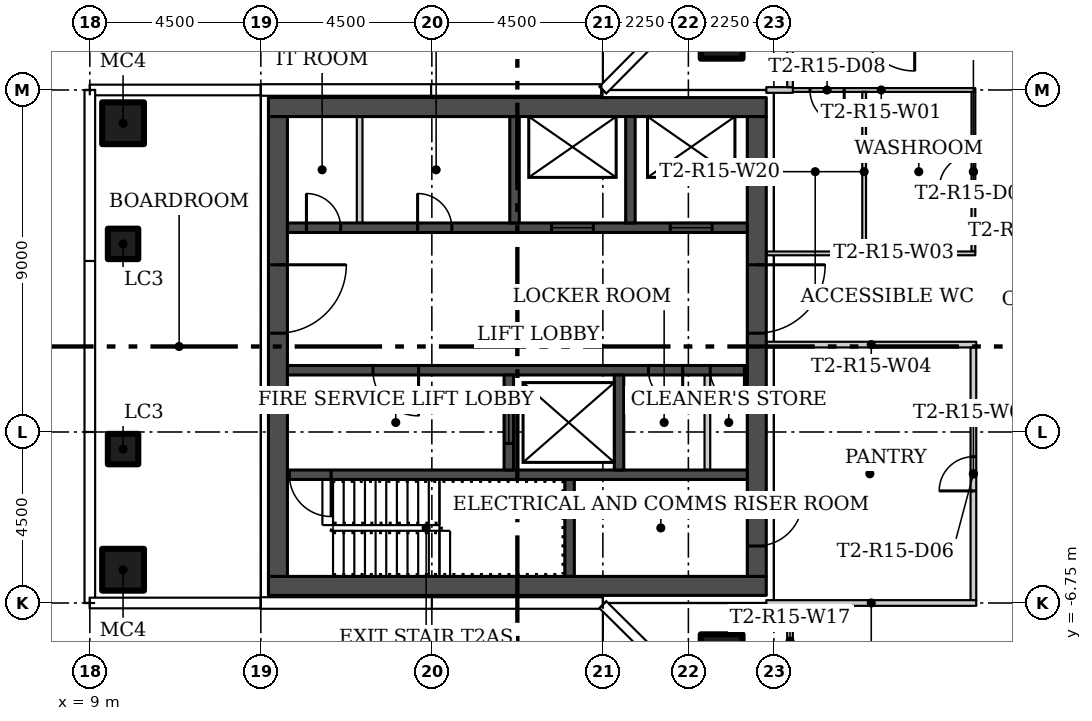
"""IFC4 building model, lengths in metres.
Left out: names, types, materials, properties, quantities, classifications, styles, units other than length and angle.
Written with IfcOpenShell. Run it as: python <this file> out.ifc"""

import sys

from ifc_helpers import new_model, si_unit, direction, frame, frame_2d, origin, origin_2d, place, context, subcontext, project, spatial, rectangle, hollow_rectangle, extrude, element, fill, save


model = new_model("IFC4")
c1 = context("Model", 3, precision=1e-05, world=origin(), true_north=direction((0.0, 1.0)))
c2 = subcontext(c1, "Body", "Model", "MODEL_VIEW")
j1 = project(units=[si_unit("LENGTHUNIT", "METRE"), si_unit("PLANEANGLEUNIT", "RADIAN")], contexts=[c1])
p1 = place(None, origin())
s1 = spatial("IfcSite", under=j1, at=p1, CompositionType="ELEMENT")
p2 = place(p1, origin())
s2 = spatial("IfcBuilding", under=s1, at=p2, CompositionType="ELEMENT")
p3 = place(p2, frame((0.0, 0.0, 142.8)))
s3 = spatial("IfcBuildingStorey", under=s2, at=p3, CompositionType="ELEMENT", Elevation=142.8)
for number, where in (
    (1, (25.625, 8.125, 0.0)),
    (2, (25.625, -8.125, 0.0)),
    (3, (9.875, -5.875, 0.0)),
    (4, (9.875, 5.875, 0.0)),
):
    element("IfcColumn", number, at=place(p3, frame(where)), inside=s3, PredefinedType="COLUMN", context=c2, shape_type="SweptSolid", body=[
        extrude(hollow_rectangle(XDim=1.1, YDim=1.1, WallThickness=0.04, at=origin_2d()), origin(), (0.0, 0.0, 1.0), 3.55),
    ])
for number, where in (
    (5, (9.875, -2.7, 0.0)),
    (6, (9.875, 2.7, 0.0)),
):
    element("IfcColumn", number, at=place(p3, frame(where)), inside=s3, PredefinedType="COLUMN", context=c2, shape_type="SweptSolid", body=[
        extrude(hollow_rectangle(XDim=0.8, YDim=0.8, WallThickness=0.03, at=origin_2d()), origin(), (0.0, 0.0, 1.0), 3.55),
    ])
p4 = place(p3, frame((32.3, 6.75, 0.0), z_axis=(0.0, 0.0, 1.0), x_axis=(-1.0, 0.0, 0.0)))
e7 = element("IfcWall", 7, at=p4, inside=s3, PredefinedType="PARTITIONING", context=c2, shape_type="SweptSolid", body=[
    extrude(rectangle(XDim=4.95, YDim=0.1, at=frame_2d((2.475, 0.0))), origin(), (0.0, 0.0, 1.0), 3.55),
])
p5 = place(p4, frame((3.45, 0.0, 0.0)))
e8 = element("IfcOpeningElement", 8, at=p5, cuts=e7, PredefinedType="OPENING", context=c2, shape_type="SweptSolid", body=[
    extrude(rectangle(XDim=0.9, YDim=2.1, at=frame_2d((0.45, 1.05))), frame((0.0, 0.06, 0.0), z_axis=(0.0, -1.0, 0.0), x_axis=(1.0, 0.0, 0.0)), (0.0, 0.0, 1.0), 0.12),
])
p6 = place(p3, frame((32.25, 2.5, 0.0), z_axis=(0.0, 0.0, 1.0), x_axis=(0.0, 1.0, 0.0)))
e9 = element("IfcWall", 9, at=p6, inside=s3, PredefinedType="PARTITIONING", context=c2, shape_type="SweptSolid", body=[
    extrude(rectangle(XDim=4.2, YDim=0.1, at=frame_2d((2.1, 0.0))), origin(), (0.0, 0.0, 1.0), 3.55),
])
p7 = place(p6, frame((1.65, 0.0, 0.0)))
e10 = element("IfcOpeningElement", 10, at=p7, cuts=e9, PredefinedType="OPENING", context=c2, shape_type="SweptSolid", body=[
    extrude(rectangle(XDim=0.9, YDim=2.1, at=frame_2d((0.45, 1.05))), frame((0.0, 0.06, 0.0), z_axis=(0.0, -1.0, 0.0), x_axis=(1.0, 0.0, 0.0)), (0.0, 0.0, 1.0), 0.12),
])
p8 = place(p3, frame((26.8, 2.45, 0.0)))
e11 = element("IfcWall", 11, at=p8, inside=s3, PredefinedType="PARTITIONING", context=c2, shape_type="SweptSolid", body=[
    extrude(rectangle(XDim=5.5, YDim=0.1, at=frame_2d((2.75, 0.0))), origin(), (0.0, 0.0, 1.0), 3.55),
])
p9 = place(p3, frame((32.325, 0.05, 0.0), z_axis=(0.0, 0.0, 1.0), x_axis=(-1.0, 0.0, 0.0)))
e12 = element("IfcWall", 12, at=p9, inside=s3, PredefinedType="PARTITIONING", context=c2, shape_type="SweptSolid", body=[
    extrude(rectangle(XDim=5.525, YDim=0.15, at=frame_2d((2.762, 0.0))), origin(), (0.0, 0.0, 1.0), 3.55),
])
p10 = place(p3, frame((32.25, -6.675, 0.0), z_axis=(0.0, 0.0, 1.0), x_axis=(0.0, 1.0, 0.0)))
e13 = element("IfcWall", 13, at=p10, inside=s3, PredefinedType="PARTITIONING", context=c2, shape_type="SweptSolid", body=[
    extrude(rectangle(XDim=6.65, YDim=0.15, at=frame_2d((3.325, 0.0))), origin(), (0.0, 0.0, 1.0), 3.55),
])
p11 = place(p10, frame((2.875, 0.0, 0.0)))
e14 = element("IfcOpeningElement", 14, at=p11, cuts=e13, PredefinedType="OPENING", context=c2, shape_type="SweptSolid", body=[
    extrude(rectangle(XDim=0.9, YDim=2.1, at=frame_2d((0.45, 1.05))), frame((0.0, 0.085, 0.0), z_axis=(0.0, -1.0, 0.0), x_axis=(1.0, 0.0, 0.0)), (0.0, 0.0, 1.0), 0.17),
])
p12 = place(p3, frame((26.8, -6.75, 0.0)))
e15 = element("IfcWall", 15, at=p12, inside=s3, PredefinedType="PARTITIONING", context=c2, shape_type="SweptSolid", body=[
    extrude(rectangle(XDim=5.525, YDim=0.15, at=frame_2d((2.762, 0.0))), origin(), (0.0, 0.0, 1.0), 3.55),
])
p13 = place(p3, frame((27.5, 6.75, 0.0), z_axis=(0.0, 0.0, 1.0), x_axis=(-1.0, 0.0, 0.0)))
e16 = element("IfcWall", 16, at=p13, inside=s3, PredefinedType="PARTITIONING", context=c2, shape_type="SweptSolid", body=[
    extrude(rectangle(XDim=0.7, YDim=0.15, at=frame_2d((0.35, 0.0))), origin(), (0.0, 0.0, 1.0), 3.55),
])
for number, where, z_axis, x_axis in (
    (17, (27.425, -6.825, 0.0), (0.0, 0.0, 1.0), (0.0, -1.0, 0.0)),
    (18, (27.425, 8.675, 0.0), (0.0, 0.0, 1.0), (0.0, -1.0, 0.0)),
):
    element("IfcWall", number, at=place(p3, frame(where, z_axis=z_axis, x_axis=x_axis)), inside=s3, PredefinedType="PARTITIONING", context=c2, shape_type="SweptSolid", body=[
        extrude(rectangle(XDim=1.85, YDim=0.15, at=frame_2d((0.925, 0.0))), origin(), (0.0, 0.0, 1.0), 3.55),
    ])
p14 = place(p3, frame((29.375, 6.7, 0.0), z_axis=(0.0, 0.0, 1.0), x_axis=(0.0, -1.0, 0.0)))
e19 = element("IfcWall", 19, at=p14, inside=s3, PredefinedType="PARTITIONING", context=c2, shape_type="SweptSolid", body=[
    extrude(rectangle(XDim=4.2, YDim=0.1, at=frame_2d((2.1, 0.0))), origin(), (0.0, 0.0, 1.0), 3.55),
])
for number, where in (
    (20, (13.7, -6.3, 0.0)),
    (21, (13.7, 6.3, 0.0)),
):
    element("IfcWall", number, at=place(p3, frame(where)), inside=s3, PredefinedType="SHEAR", context=c2, shape_type="SweptSolid", body=[
        extrude(rectangle(XDim=13.1, YDim=0.5, at=frame_2d((6.55, 0.0))), origin(), (0.0, 0.0, 1.0), 3.55),
    ])
p15 = place(p3, frame((13.95, 6.05, 0.0), z_axis=(0.0, 0.0, 1.0), x_axis=(0.0, -1.0, 0.0)))
e22 = element("IfcWall", 22, at=p15, inside=s3, PredefinedType="SHEAR", context=c2, shape_type="SweptSolid", body=[
    extrude(rectangle(XDim=12.1, YDim=0.5, at=frame_2d((6.05, 0.0))), origin(), (0.0, 0.0, 1.0), 3.55),
])
p16 = place(p15, frame((3.9, 0.0, 0.0)))
e23 = element("IfcOpeningElement", 23, at=p16, cuts=e22, PredefinedType="OPENING", context=c2, shape_type="SweptSolid", body=[
    extrude(rectangle(XDim=1.8, YDim=2.4, at=frame_2d((0.9, 1.2))), frame((0.0, 0.26, 0.0), z_axis=(0.0, -1.0, 0.0), x_axis=(1.0, 0.0, 0.0)), (0.0, 0.0, 1.0), 0.52),
])
p17 = place(p3, frame((26.55, 6.05, 0.0), z_axis=(0.0, 0.0, 1.0), x_axis=(0.0, -1.0, 0.0)))
e24 = element("IfcWall", 24, at=p17, inside=s3, PredefinedType="SHEAR", context=c2, shape_type="SweptSolid", body=[
    extrude(rectangle(XDim=12.1, YDim=0.5, at=frame_2d((6.05, 0.0))), origin(), (0.0, 0.0, 1.0), 3.55),
])
p18 = place(p17, frame((10.1, 0.0, 0.0)))
e25 = element("IfcOpeningElement", 25, at=p18, cuts=e24, PredefinedType="OPENING", context=c2, shape_type="SweptSolid", body=[
    extrude(rectangle(XDim=1.2, YDim=2.1, at=frame_2d((0.6, 1.05))), frame((0.0, 0.26, 0.0), z_axis=(0.0, -1.0, 0.0), x_axis=(1.0, 0.0, 0.0)), (0.0, 0.0, 1.0), 0.52),
])
p19 = place(p17, frame((3.9, 0.0, 0.0)))
e26 = element("IfcOpeningElement", 26, at=p19, cuts=e24, PredefinedType="OPENING", context=c2, shape_type="SweptSolid", body=[
    extrude(rectangle(XDim=1.8, YDim=2.4, at=frame_2d((0.9, 1.2))), frame((0.0, 0.26, 0.0), z_axis=(0.0, -1.0, 0.0), x_axis=(1.0, 0.0, 0.0)), (0.0, 0.0, 1.0), 0.52),
])
p20 = place(p3, frame((26.3, -3.375, 0.0), z_axis=(0.0, 0.0, 1.0), x_axis=(-1.0, 0.0, 0.0)))
e27 = element("IfcWall", 27, at=p20, inside=s3, PredefinedType="SHEAR", context=c2, shape_type="SweptSolid", body=[
    extrude(rectangle(XDim=12.1, YDim=0.25, at=frame_2d((6.05, 0.0))), origin(), (0.0, 0.0, 1.0), 3.55),
])
p21 = place(p20, frame((10.95, 0.0, 0.0)))
e28 = element("IfcOpeningElement", 28, at=p21, cuts=e27, PredefinedType="OPENING", context=c2, shape_type="SweptSolid", body=[
    extrude(rectangle(XDim=1.1, YDim=2.1, at=frame_2d((0.55, 1.05))), frame((0.0, 0.135, 0.0), z_axis=(0.0, -1.0, 0.0), x_axis=(1.0, 0.0, 0.0)), (0.0, 0.0, 1.0), 0.27),
])
p22 = place(p3, frame((21.625, -6.05, 0.0), z_axis=(0.0, 0.0, 1.0), x_axis=(0.0, 1.0, 0.0)))
e29 = element("IfcWall", 29, at=p22, inside=s3, PredefinedType="SHEAR", context=c2, shape_type="SweptSolid", body=[
    extrude(rectangle(XDim=2.55, YDim=0.25, at=frame_2d((1.275, 0.0))), origin(), (0.0, 0.0, 1.0), 3.55),
])
p23 = place(p3, frame((26.3, -0.625, 0.0), z_axis=(0.0, 0.0, 1.0), x_axis=(-1.0, 0.0, 0.0)))
e30 = element("IfcWall", 30, at=p23, inside=s3, PredefinedType="SHEAR", context=c2, shape_type="SweptSolid", body=[
    extrude(rectangle(XDim=12.1, YDim=0.25, at=frame_2d((6.05, 0.0))), origin(), (0.0, 0.0, 1.0), 3.55),
])
p24 = place(p23, frame((8.65, 0.0, 0.0)))
e31 = element("IfcOpeningElement", 31, at=p24, cuts=e30, PredefinedType="OPENING", context=c2, shape_type="SweptSolid", body=[
    extrude(rectangle(XDim=1.2, YDim=2.1, at=frame_2d((0.6, 1.05))), frame((0.0, 0.135, 0.0), z_axis=(0.0, -1.0, 0.0), x_axis=(1.0, 0.0, 0.0)), (0.0, 0.0, 1.0), 0.27),
])
p25 = place(p23, frame((1.7, 0.0, 0.0)))
e32 = element("IfcOpeningElement", 32, at=p25, cuts=e30, PredefinedType="OPENING", context=c2, shape_type="SweptSolid", body=[
    extrude(rectangle(XDim=0.9, YDim=2.1, at=frame_2d((0.45, 1.05))), frame((0.0, 0.135, 0.0), z_axis=(0.0, -1.0, 0.0), x_axis=(1.0, 0.0, 0.0)), (0.0, 0.0, 1.0), 0.27),
])
p26 = place(p23, frame((0.075, 0.0, 0.0)))
e33 = element("IfcOpeningElement", 33, at=p26, cuts=e30, PredefinedType="OPENING", context=c2, shape_type="SweptSolid", body=[
    extrude(rectangle(XDim=0.9, YDim=2.1, at=frame_2d((0.45, 1.05))), frame((0.0, 0.135, 0.0), z_axis=(0.0, -1.0, 0.0), x_axis=(1.0, 0.0, 0.0)), (0.0, 0.0, 1.0), 0.27),
])
p27 = place(p3, frame((20.025, -3.25, 0.0), z_axis=(0.0, 0.0, 1.0), x_axis=(0.0, 1.0, 0.0)))
e34 = element("IfcWall", 34, at=p27, inside=s3, PredefinedType="SHEAR", context=c2, shape_type="SweptSolid", body=[
    extrude(rectangle(XDim=2.5, YDim=0.25, at=frame_2d((1.25, 0.0))), origin(), (0.0, 0.0, 1.0), 3.55),
])
p28 = place(p27, frame((0.7, 0.0, 0.0)))
e35 = element("IfcOpeningElement", 35, at=p28, cuts=e34, PredefinedType="OPENING", context=c2, shape_type="SweptSolid", body=[
    extrude(rectangle(XDim=1.1, YDim=2.1, at=frame_2d((0.55, 1.05))), frame((0.0, 0.135, 0.0), z_axis=(0.0, -1.0, 0.0), x_axis=(1.0, 0.0, 0.0)), (0.0, 0.0, 1.0), 0.27),
])
p29 = place(p3, frame((22.925, -3.25, 0.0), z_axis=(0.0, 0.0, 1.0), x_axis=(0.0, 1.0, 0.0)))
e36 = element("IfcWall", 36, at=p29, inside=s3, PredefinedType="SHEAR", context=c2, shape_type="SweptSolid", body=[
    extrude(rectangle(XDim=2.5, YDim=0.25, at=frame_2d((1.25, 0.0))), origin(), (0.0, 0.0, 1.0), 3.55),
])
p30 = place(p3, frame((25.25, -3.25, 0.0), z_axis=(0.0, 0.0, 1.0), x_axis=(0.0, 1.0, 0.0)))
e37 = element("IfcWall", 37, at=p30, inside=s3, PredefinedType="PARTITIONING", context=c2, shape_type="SweptSolid", body=[
    extrude(rectangle(XDim=2.5, YDim=0.15, at=frame_2d((1.25, 0.0))), origin(), (0.0, 0.0, 1.0), 3.55),
])
p31 = place(p3, frame((14.2, 3.125, 0.0)))
e38 = element("IfcWall", 38, at=p31, inside=s3, PredefinedType="SHEAR", context=c2, shape_type="SweptSolid", body=[
    extrude(rectangle(XDim=12.1, YDim=0.25, at=frame_2d((6.05, 0.0))), origin(), (0.0, 0.0, 1.0), 3.55),
])
p32 = place(p31, frame((6.95, 0.0, 0.0)))
e39 = element("IfcOpeningElement", 39, at=p32, cuts=e38, PredefinedType="OPENING", context=c2, shape_type="SweptSolid", body=[
    extrude(rectangle(XDim=1.1, YDim=2.1, at=frame_2d((0.55, 1.05))), frame((0.0, 0.135, 0.0), z_axis=(0.0, -1.0, 0.0), x_axis=(1.0, 0.0, 0.0)), (0.0, 0.0, 1.0), 0.27),
])
p33 = place(p31, frame((10.075, 0.0, 0.0)))
e40 = element("IfcOpeningElement", 40, at=p33, cuts=e38, PredefinedType="OPENING", context=c2, shape_type="SweptSolid", body=[
    extrude(rectangle(XDim=1.1, YDim=2.1, at=frame_2d((0.55, 1.05))), frame((0.0, 0.135, 0.0), z_axis=(0.0, -1.0, 0.0), x_axis=(1.0, 0.0, 0.0)), (0.0, 0.0, 1.0), 0.27),
])
p34 = place(p31, frame((0.5, 0.0, 0.0)))
e41 = element("IfcOpeningElement", 41, at=p34, cuts=e38, PredefinedType="OPENING", context=c2, shape_type="SweptSolid", body=[
    extrude(rectangle(XDim=0.9, YDim=2.1, at=frame_2d((0.45, 1.05))), frame((0.0, 0.135, 0.0), z_axis=(0.0, -1.0, 0.0), x_axis=(1.0, 0.0, 0.0)), (0.0, 0.0, 1.0), 0.27),
])
p35 = place(p31, frame((3.425, 0.0, 0.0)))
e42 = element("IfcOpeningElement", 42, at=p35, cuts=e38, PredefinedType="OPENING", context=c2, shape_type="SweptSolid", body=[
    extrude(rectangle(XDim=0.9, YDim=2.1, at=frame_2d((0.45, 1.05))), frame((0.0, 0.135, 0.0), z_axis=(0.0, -1.0, 0.0), x_axis=(1.0, 0.0, 0.0)), (0.0, 0.0, 1.0), 0.27),
])
for number, where, z_axis, x_axis in (
    (43, (20.175, 3.25, 0.0), (0.0, 0.0, 1.0), (0.0, 1.0, 0.0)),
    (44, (23.225, 3.25, 0.0), (0.0, 0.0, 1.0), (0.0, 1.0, 0.0)),
):
    element("IfcWall", number, at=place(p3, frame(where, z_axis=z_axis, x_axis=x_axis)), inside=s3, PredefinedType="SHEAR", context=c2, shape_type="SweptSolid", body=[
        extrude(rectangle(XDim=2.8, YDim=0.25, at=frame_2d((1.4, 0.0))), origin(), (0.0, 0.0, 1.0), 3.55),
    ])
p36 = place(p3, frame((16.1, 3.25, 0.0), z_axis=(0.0, 0.0, 1.0), x_axis=(0.0, 1.0, 0.0)))
e45 = element("IfcWall", 45, at=p36, inside=s3, PredefinedType="PARTITIONING", context=c2, shape_type="SweptSolid", body=[
    extrude(rectangle(XDim=2.8, YDim=0.15, at=frame_2d((1.4, 0.0))), origin(), (0.0, 0.0, 1.0), 3.55),
])
p37 = place(p11, origin())
e46 = element("IfcDoor", 46, at=p37, inside=s3, OperationType="SINGLE_SWING_LEFT", PredefinedType="DOOR", context=c2, shape_type="SweptSolid", body=[
    extrude(rectangle(XDim=0.9, YDim=2.1, at=frame_2d((0.45, 1.05))), frame((0.0, 0.025, 0.0), z_axis=(0.0, -1.0, 0.0), x_axis=(1.0, 0.0, 0.0)), (0.0, 0.0, 1.0), 0.05),
])
fill(e14, e46)
p38 = place(p7, origin())
e47 = element("IfcDoor", 47, at=p38, inside=s3, OperationType="SINGLE_SWING_RIGHT", PredefinedType="DOOR", context=c2, shape_type="SweptSolid", body=[
    extrude(rectangle(XDim=0.9, YDim=2.1, at=frame_2d((0.45, 1.05))), frame((0.0, 0.025, 0.0), z_axis=(0.0, -1.0, 0.0), x_axis=(1.0, 0.0, 0.0)), (0.0, 0.0, 1.0), 0.05),
])
fill(e10, e47)
p39 = place(p5, origin())
e48 = element("IfcDoor", 48, at=p39, inside=s3, OperationType="SINGLE_SWING_LEFT", PredefinedType="DOOR", context=c2, shape_type="SweptSolid", body=[
    extrude(rectangle(XDim=0.9, YDim=2.1, at=frame_2d((0.45, 1.05))), frame((0.0, 0.025, 0.0), z_axis=(0.0, -1.0, 0.0), x_axis=(1.0, 0.0, 0.0)), (0.0, 0.0, 1.0), 0.05),
])
fill(e8, e48)
p40 = place(p16, origin())
e49 = element("IfcDoor", 49, at=p40, inside=s3, OperationType="DOUBLE_DOOR_SINGLE_SWING", PredefinedType="DOOR", context=c2, shape_type="SweptSolid", body=[
    extrude(rectangle(XDim=1.8, YDim=2.4, at=frame_2d((0.9, 1.2))), frame((0.0, 0.025, 0.0), z_axis=(0.0, -1.0, 0.0), x_axis=(1.0, 0.0, 0.0)), (0.0, 0.0, 1.0), 0.05),
])
fill(e23, e49)
p41 = place(p18, origin())
e50 = element("IfcDoor", 50, at=p41, inside=s3, OperationType="SINGLE_SWING_RIGHT", PredefinedType="DOOR", context=c2, shape_type="SweptSolid", body=[
    extrude(rectangle(XDim=1.2, YDim=2.1, at=frame_2d((0.6, 1.05))), frame((0.0, 0.025, 0.0), z_axis=(0.0, -1.0, 0.0), x_axis=(1.0, 0.0, 0.0)), (0.0, 0.0, 1.0), 0.05),
])
fill(e25, e50)
p42 = place(p19, origin())
e51 = element("IfcDoor", 51, at=p42, inside=s3, OperationType="DOUBLE_DOOR_SINGLE_SWING", PredefinedType="DOOR", context=c2, shape_type="SweptSolid", body=[
    extrude(rectangle(XDim=1.8, YDim=2.4, at=frame_2d((0.9, 1.2))), frame((0.0, 0.025, 0.0), z_axis=(0.0, -1.0, 0.0), x_axis=(1.0, 0.0, 0.0)), (0.0, 0.0, 1.0), 0.05),
])
fill(e26, e51)
p43 = place(p21, origin())
e52 = element("IfcDoor", 52, at=p43, inside=s3, OperationType="SINGLE_SWING_RIGHT", PredefinedType="DOOR", context=c2, shape_type="SweptSolid", body=[
    extrude(rectangle(XDim=1.1, YDim=2.1, at=frame_2d((0.55, 1.05))), frame((0.0, 0.025, 0.0), z_axis=(0.0, -1.0, 0.0), x_axis=(1.0, 0.0, 0.0)), (0.0, 0.0, 1.0), 0.05),
])
fill(e28, e52)
p44 = place(p24, origin())
e53 = element("IfcDoor", 53, at=p44, inside=s3, OperationType="SINGLE_SWING_RIGHT", PredefinedType="DOOR", context=c2, shape_type="SweptSolid", body=[
    extrude(rectangle(XDim=1.2, YDim=2.1, at=frame_2d((0.6, 1.05))), frame((0.0, 0.025, 0.0), z_axis=(0.0, -1.0, 0.0), x_axis=(1.0, 0.0, 0.0)), (0.0, 0.0, 1.0), 0.05),
])
fill(e31, e53)
p45 = place(p25, origin())
e54 = element("IfcDoor", 54, at=p45, inside=s3, OperationType="SINGLE_SWING_LEFT", PredefinedType="DOOR", context=c2, shape_type="SweptSolid", body=[
    extrude(rectangle(XDim=0.9, YDim=2.1, at=frame_2d((0.45, 1.05))), frame((0.0, 0.025, 0.0), z_axis=(0.0, -1.0, 0.0), x_axis=(1.0, 0.0, 0.0)), (0.0, 0.0, 1.0), 0.05),
])
fill(e32, e54)
p46 = place(p26, origin())
e55 = element("IfcDoor", 55, at=p46, inside=s3, OperationType="SINGLE_SWING_LEFT", PredefinedType="DOOR", context=c2, shape_type="SweptSolid", body=[
    extrude(rectangle(XDim=0.9, YDim=2.1, at=frame_2d((0.45, 1.05))), frame((0.0, 0.025, 0.0), z_axis=(0.0, -1.0, 0.0), x_axis=(1.0, 0.0, 0.0)), (0.0, 0.0, 1.0), 0.05),
])
fill(e33, e55)
p47 = place(p28, origin())
e56 = element("IfcDoor", 56, at=p47, inside=s3, OperationType="SLIDING_TO_LEFT", PredefinedType="DOOR", context=c2, shape_type="SweptSolid", body=[
    extrude(rectangle(XDim=1.1, YDim=2.1, at=frame_2d((0.55, 1.05))), frame((0.0, 0.025, 0.0), z_axis=(0.0, -1.0, 0.0), x_axis=(1.0, 0.0, 0.0)), (0.0, 0.0, 1.0), 0.05),
])
fill(e35, e56)
p48 = place(p32, origin())
e57 = element("IfcDoor", 57, at=p48, inside=s3, OperationType="SLIDING_TO_LEFT", PredefinedType="DOOR", context=c2, shape_type="SweptSolid", body=[
    extrude(rectangle(XDim=1.1, YDim=2.1, at=frame_2d((0.55, 1.05))), frame((0.0, 0.025, 0.0), z_axis=(0.0, -1.0, 0.0), x_axis=(1.0, 0.0, 0.0)), (0.0, 0.0, 1.0), 0.05),
])
fill(e39, e57)
p49 = place(p33, origin())
e58 = element("IfcDoor", 58, at=p49, inside=s3, OperationType="SLIDING_TO_LEFT", PredefinedType="DOOR", context=c2, shape_type="SweptSolid", body=[
    extrude(rectangle(XDim=1.1, YDim=2.1, at=frame_2d((0.55, 1.05))), frame((0.0, 0.025, 0.0), z_axis=(0.0, -1.0, 0.0), x_axis=(1.0, 0.0, 0.0)), (0.0, 0.0, 1.0), 0.05),
])
fill(e40, e58)
p50 = place(p34, origin())
e59 = element("IfcDoor", 59, at=p50, inside=s3, OperationType="SINGLE_SWING_LEFT", PredefinedType="DOOR", context=c2, shape_type="SweptSolid", body=[
    extrude(rectangle(XDim=0.9, YDim=2.1, at=frame_2d((0.45, 1.05))), frame((0.0, 0.025, 0.0), z_axis=(0.0, -1.0, 0.0), x_axis=(1.0, 0.0, 0.0)), (0.0, 0.0, 1.0), 0.05),
])
fill(e41, e59)
p51 = place(p35, origin())
e60 = element("IfcDoor", 60, at=p51, inside=s3, OperationType="SINGLE_SWING_LEFT", PredefinedType="DOOR", context=c2, shape_type="SweptSolid", body=[
    extrude(rectangle(XDim=0.9, YDim=2.1, at=frame_2d((0.45, 1.05))), frame((0.0, 0.025, 0.0), z_axis=(0.0, -1.0, 0.0), x_axis=(1.0, 0.0, 0.0)), (0.0, 0.0, 1.0), 0.05),
])
fill(e42, e60)
save(model, sys.argv[1])
